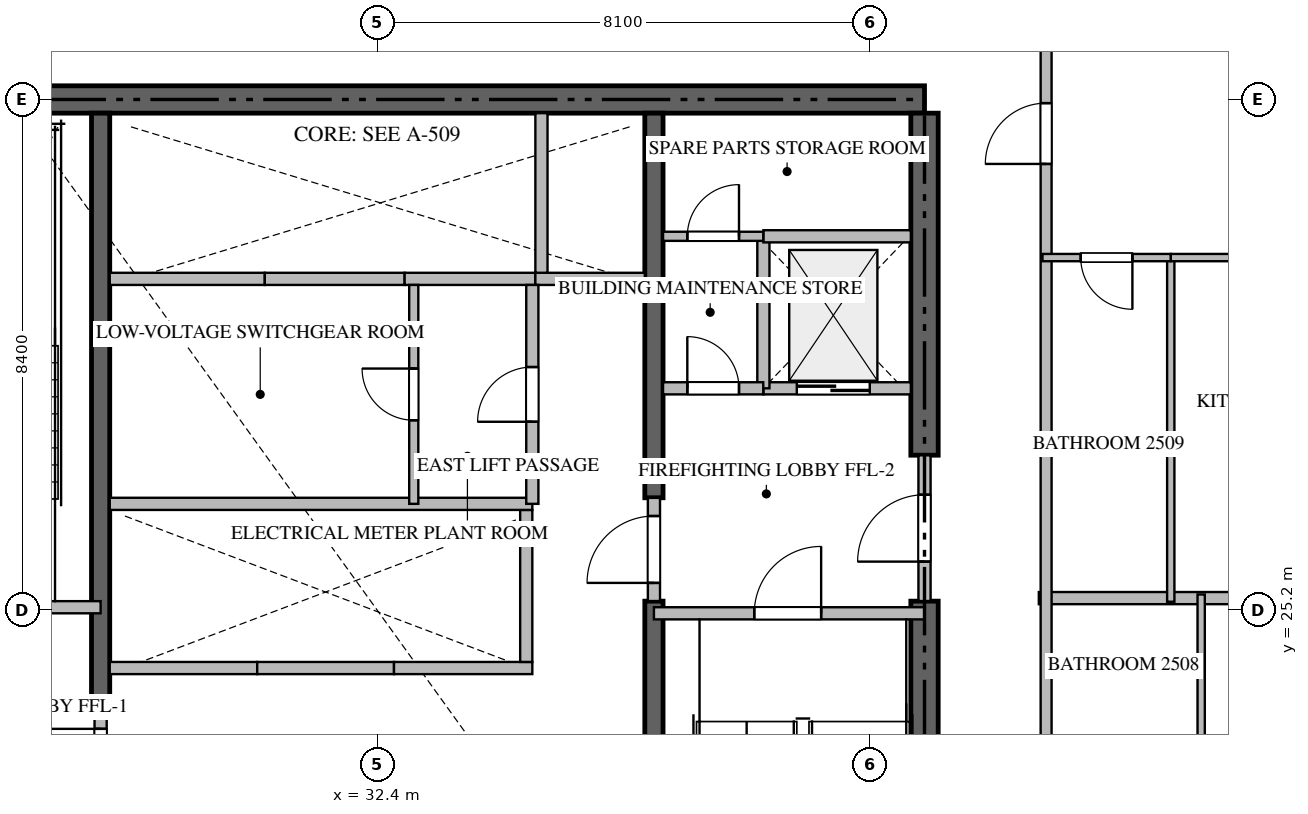
"""IFC4 building model, lengths in metres.
Left out: names, types, materials, properties, quantities, classifications, styles, units other than length and angle.
Written with IfcOpenShell. Run it as: python <this file> out.ifc"""

import sys

from ifc_helpers import new_model, si_unit, direction, frame, frame_2d, origin, place, context, subcontext, project, spatial, rectangle, extrude, source, transform, mapped, element, fill, save


model = new_model("IFC4")
c1 = context("Model", 3, precision=1e-05, world=origin(), true_north=direction((0.0, 1.0)))
c2 = subcontext(c1, "Body", "Model", "MODEL_VIEW")
j1 = project(units=[si_unit("LENGTHUNIT", "METRE"), si_unit("PLANEANGLEUNIT", "RADIAN")], contexts=[c1])
p1 = place(None, origin())
s1 = spatial("IfcSite", under=j1, at=p1, CompositionType="ELEMENT")
p2 = place(p1, origin())
s2 = spatial("IfcBuilding", under=s1, at=p2, CompositionType="ELEMENT")
p3 = place(p2, frame((0.0, 0.0, 101.7)))
s3 = spatial("IfcBuildingStorey", under=s2, at=p3, CompositionType="ELEMENT", Elevation=101.7)
p4 = place(p3, frame((41.4, 33.6, -0.26), z_axis=(0.0, 0.0, 1.0), x_axis=(-1.0, 0.0, 0.0)))
e1 = element("IfcWall", 1, at=p4, inside=s3, PredefinedType="SHEAR", context=c2, shape_type="SweptSolid", body=[
    extrude(rectangle(XDim=18.0, YDim=0.45, at=frame_2d((9.0, 0.0))), origin(), (0.0, 0.0, 1.0), 3.748),
])
p5 = place(p3, frame((41.4, 17.025, -0.26), z_axis=(0.0, 0.0, 1.0), x_axis=(0.0, 1.0, 0.0)))
e2 = element("IfcWall", 2, at=p5, inside=s3, PredefinedType="SHEAR", context=c2, shape_type="SweptSolid", body=[
    extrude(rectangle(XDim=8.325, YDim=0.45, at=frame_2d((4.163, 0.0))), origin(), (0.0, 0.0, 1.0), 3.748),
])
p6 = place(p3, frame((41.4, 27.75, -0.26), z_axis=(0.0, 0.0, 1.0), x_axis=(0.0, 1.0, 0.0)))
e3 = element("IfcWall", 3, at=p6, inside=s3, PredefinedType="SHEAR", context=c2, shape_type="SweptSolid", body=[
    extrude(rectangle(XDim=5.625, YDim=0.45, at=frame_2d((2.812, 0.0))), origin(), (0.0, 0.0, 1.0), 3.748),
])
p7 = place(p3, frame((27.85, 23.55, -0.26), z_axis=(0.0, 0.0, 1.0), x_axis=(0.0, 1.0, 0.0)))
e4 = element("IfcWall", 4, at=p7, inside=s3, PredefinedType="SHEAR", context=c2, shape_type="SweptSolid", body=[
    extrude(rectangle(XDim=9.825, YDim=0.3, at=frame_2d((4.913, 0.0))), origin(), (0.0, 0.0, 1.0), 3.748),
])
p8 = place(p3, frame((36.95, 17.025, -0.26), z_axis=(0.0, 0.0, 1.0), x_axis=(0.0, 1.0, 0.0)))
e5 = element("IfcWall", 5, at=p8, inside=s3, PredefinedType="SHEAR", context=c2, shape_type="SweptSolid", body=[
    extrude(rectangle(XDim=8.325, YDim=0.3, at=frame_2d((4.163, 0.0))), origin(), (0.0, 0.0, 1.0), 3.748),
])
p9 = place(p3, frame((36.95, 27.05, -0.26), z_axis=(0.0, 0.0, 1.0), x_axis=(0.0, 1.0, 0.0)))
e6 = element("IfcWall", 6, at=p9, inside=s3, PredefinedType="SHEAR", context=c2, shape_type="SweptSolid", body=[
    extrude(rectangle(XDim=6.325, YDim=0.3, at=frame_2d((3.163, 0.0))), origin(), (0.0, 0.0, 1.0), 3.748),
])
p10 = place(p3, frame((23.4, 25.25, 0.0), z_axis=(0.0, 0.0, 1.0), x_axis=(1.0, 0.0, 0.0)))
e7 = element("IfcWall", 7, at=p10, inside=s3, PredefinedType="STANDARD", context=c2, shape_type="SweptSolid", body=[
    extrude(rectangle(XDim=4.45, YDim=0.2, at=frame_2d((2.225, 0.0))), origin(), (0.0, 0.0, 1.0), 3.49),
])
p11 = place(p10, frame((1.65, 0.0, 0.0)))
e8 = element("IfcOpeningElement", 8, at=p11, cuts=e7, PredefinedType="OPENING", context=c2, shape_type="SweptSolid", body=[
    extrude(rectangle(XDim=1.1, YDim=2.15, at=frame_2d((0.55, 1.075))), frame((0.0, 0.11, 0.0), z_axis=(0.0, -1.0, 0.0), x_axis=(1.0, 0.0, 0.0)), (0.0, 0.0, 1.0), 0.22),
])
p12 = place(p3, frame((36.95, 25.15, 0.0), z_axis=(0.0, 0.0, 1.0), x_axis=(1.0, 0.0, 0.0)))
e9 = element("IfcWall", 9, at=p12, inside=s3, PredefinedType="STANDARD", context=c2, shape_type="SweptSolid", body=[
    extrude(rectangle(XDim=4.45, YDim=0.2, at=frame_2d((2.225, 0.0))), origin(), (0.0, 0.0, 1.0), 3.49),
])
p13 = place(p12, frame((1.65, 0.0, 0.0)))
e10 = element("IfcOpeningElement", 10, at=p13, cuts=e9, PredefinedType="OPENING", context=c2, shape_type="SweptSolid", body=[
    extrude(rectangle(XDim=1.1, YDim=2.15, at=frame_2d((0.55, 1.075))), frame((0.0, 0.11, 0.0), z_axis=(0.0, -1.0, 0.0), x_axis=(1.0, 0.0, 0.0)), (0.0, 0.0, 1.0), 0.22),
])
p14 = place(p3, frame((38.75, 28.85, 0.0), z_axis=(0.0, 0.0, 1.0), x_axis=(1.0, 0.0, 0.0)))
e11 = element("IfcWall", 11, at=p14, inside=s3, PredefinedType="STANDARD", context=c2, shape_type="SweptSolid", body=[
    extrude(rectangle(XDim=2.425, YDim=0.2, at=frame_2d((1.212, 0.0))), origin(), (0.0, 0.0, 1.0), 3.49),
])
p15 = place(p14, frame((0.55, 0.0, 0.0)))
e12 = element("IfcOpeningElement", 12, at=p15, cuts=e11, PredefinedType="OPENING", context=c2, shape_type="SweptSolid", body=[
    extrude(rectangle(XDim=1.2, YDim=2.2, at=frame_2d((0.6, 1.1))), frame((0.0, 0.11, 0.0), z_axis=(0.0, -1.0, 0.0), x_axis=(1.0, 0.0, 0.0)), (0.0, 0.0, 1.0), 0.22),
])
p16 = place(p3, frame((28.0, 24.25, 0.0), z_axis=(0.0, 0.0, 1.0), x_axis=(1.0, 0.0, 0.0)))
e13 = element("IfcWall", 13, at=p16, inside=s3, PredefinedType="STANDARD", context=c2, shape_type="SweptSolid", body=[
    extrude(rectangle(XDim=2.425, YDim=0.2, at=frame_2d((1.212, 0.0))), origin(), (0.0, 0.0, 1.0), 3.49),
])
p17 = place(p3, frame((30.425, 24.25, 0.0), z_axis=(0.0, 0.0, 1.0), x_axis=(1.0, 0.0, 0.0)))
e14 = element("IfcWall", 14, at=p17, inside=s3, PredefinedType="STANDARD", context=c2, shape_type="SweptSolid", body=[
    extrude(rectangle(XDim=2.25, YDim=0.2, at=frame_2d((1.125, 0.0))), origin(), (0.0, 0.0, 1.0), 3.49),
])
p18 = place(p3, frame((32.675, 24.25, 0.0), z_axis=(0.0, 0.0, 1.0), x_axis=(1.0, 0.0, 0.0)))
e15 = element("IfcWall", 15, at=p18, inside=s3, PredefinedType="STANDARD", context=c2, shape_type="SweptSolid", body=[
    extrude(rectangle(XDim=2.275, YDim=0.2, at=frame_2d((1.137, 0.0))), origin(), (0.0, 0.0, 1.0), 3.49),
])
p19 = place(p3, frame((34.85, 24.35, 0.0), z_axis=(0.0, 0.0, 1.0), x_axis=(0.0, 1.0, 0.0)))
e16 = element("IfcWall", 16, at=p19, inside=s3, PredefinedType="STANDARD", context=c2, shape_type="SweptSolid", body=[
    extrude(rectangle(XDim=2.5, YDim=0.2, at=frame_2d((1.25, 0.0))), origin(), (0.0, 0.0, 1.0), 3.49),
])
p20 = place(p3, frame((28.0, 30.65, 0.0), z_axis=(0.0, 0.0, 1.0), x_axis=(1.0, 0.0, 0.0)))
e17 = element("IfcWall", 17, at=p20, inside=s3, PredefinedType="STANDARD", context=c2, shape_type="SweptSolid", body=[
    extrude(rectangle(XDim=2.55, YDim=0.2, at=frame_2d((1.275, 0.0))), origin(), (0.0, 0.0, 1.0), 3.49),
])
p21 = place(p3, frame((30.55, 30.65, 0.0), z_axis=(0.0, 0.0, 1.0), x_axis=(1.0, 0.0, 0.0)))
e18 = element("IfcWall", 18, at=p21, inside=s3, PredefinedType="STANDARD", context=c2, shape_type="SweptSolid", body=[
    extrude(rectangle(XDim=2.3, YDim=0.2, at=frame_2d((1.15, 0.0))), origin(), (0.0, 0.0, 1.0), 3.49),
])
p22 = place(p3, frame((32.85, 30.65, 0.0), z_axis=(0.0, 0.0, 1.0), x_axis=(1.0, 0.0, 0.0)))
e19 = element("IfcWall", 19, at=p22, inside=s3, PredefinedType="STANDARD", context=c2, shape_type="SweptSolid", body=[
    extrude(rectangle(XDim=2.15, YDim=0.2, at=frame_2d((1.075, 0.0))), origin(), (0.0, 0.0, 1.0), 3.49),
])
p23 = place(p3, frame((35.0, 30.65, 0.0), z_axis=(0.0, 0.0, 1.0), x_axis=(1.0, 0.0, 0.0)))
e20 = element("IfcWall", 20, at=p23, inside=s3, PredefinedType="STANDARD", context=c2, shape_type="SweptSolid", body=[
    extrude(rectangle(XDim=1.8, YDim=0.2, at=frame_2d((0.9, 0.0))), origin(), (0.0, 0.0, 1.0), 3.49),
])
p24 = place(p3, frame((35.1, 30.75, 0.0), z_axis=(0.0, 0.0, 1.0), x_axis=(0.0, 1.0, 0.0)))
e21 = element("IfcWall", 21, at=p24, inside=s3, PredefinedType="STANDARD", context=c2, shape_type="SweptSolid", body=[
    extrude(rectangle(XDim=2.625, YDim=0.2, at=frame_2d((1.312, 0.0))), origin(), (0.0, 0.0, 1.0), 3.49),
])
p25 = place(p3, frame((38.75, 28.85, 0.0), z_axis=(0.0, 0.0, 1.0), x_axis=(0.0, 1.0, 0.0)))
e22 = element("IfcWall", 22, at=p25, inside=s3, PredefinedType="STANDARD", context=c2, shape_type="SweptSolid", body=[
    extrude(rectangle(XDim=2.5, YDim=0.2, at=frame_2d((1.25, 0.0))), origin(), (0.0, 0.0, 1.0), 3.49),
])
p26 = place(p3, frame((38.75, 31.35, 0.0), z_axis=(0.0, 0.0, 1.0), x_axis=(1.0, 0.0, 0.0)))
e23 = element("IfcWall", 23, at=p26, inside=s3, PredefinedType="STANDARD", context=c2, shape_type="SweptSolid", body=[
    extrude(rectangle(XDim=2.425, YDim=0.2, at=frame_2d((1.212, 0.0))), origin(), (0.0, 0.0, 1.0), 3.49),
])
p27 = place(p3, frame((37.1, 28.85, 0.0), z_axis=(0.0, 0.0, 1.0), x_axis=(1.0, 0.0, 0.0)))
e24 = element("IfcWall", 24, at=p27, inside=s3, PredefinedType="STANDARD", context=c2, shape_type="SweptSolid", body=[
    extrude(rectangle(XDim=1.648, YDim=0.2, at=frame_2d((0.824, 0.0))), origin(), (0.0, 0.0, 1.0), 3.49),
])
p28 = place(p27, frame((0.399, 0.0, 0.0)))
e25 = element("IfcOpeningElement", 25, at=p28, cuts=e24, PredefinedType="OPENING", context=c2, shape_type="SweptSolid", body=[
    extrude(rectangle(XDim=0.85, YDim=2.1, at=frame_2d((0.425, 1.05))), frame((0.0, 0.11, 0.0), z_axis=(0.0, -1.0, 0.0), x_axis=(1.0, 0.0, 0.0)), (0.0, 0.0, 1.0), 0.22),
])
p29 = place(p3, frame((41.4, 25.352, 0.0), z_axis=(0.0, 0.0, 1.0), x_axis=(0.0, 1.0, 0.0)))
e26 = element("IfcWall", 26, at=p29, inside=s3, PredefinedType="STANDARD", context=c2, shape_type="SweptSolid", body=[
    extrude(rectangle(XDim=2.396, YDim=0.2, at=frame_2d((1.198, 0.0))), origin(), (0.0, 0.0, 1.0), 3.49),
])
p30 = place(p29, frame((0.648, 0.0, 0.0)))
e27 = element("IfcOpeningElement", 27, at=p30, cuts=e26, PredefinedType="OPENING", context=c2, shape_type="SweptSolid", body=[
    extrude(rectangle(XDim=1.1, YDim=2.15, at=frame_2d((0.55, 1.075))), frame((0.0, 0.11, 0.0), z_axis=(0.0, -1.0, 0.0), x_axis=(1.0, 0.0, 0.0)), (0.0, 0.0, 1.0), 0.22),
])
p31 = place(p3, frame((27.85, 21.852, 0.0), z_axis=(0.0, 0.0, 1.0), x_axis=(0.0, 1.0, 0.0)))
e28 = element("IfcWall", 28, at=p31, inside=s3, PredefinedType="STANDARD", context=c2, shape_type="SweptSolid", body=[
    extrude(rectangle(XDim=1.696, YDim=0.2, at=frame_2d((0.848, 0.0))), origin(), (0.0, 0.0, 1.0), 3.49),
])
p32 = place(p31, frame((0.298, 0.0, 0.0)))
e29 = element("IfcOpeningElement", 29, at=p32, cuts=e28, PredefinedType="OPENING", context=c2, shape_type="SweptSolid", body=[
    extrude(rectangle(XDim=1.1, YDim=2.15, at=frame_2d((0.55, 1.075))), frame((0.0, 0.11, 0.0), z_axis=(0.0, -1.0, 0.0), x_axis=(1.0, 0.0, 0.0)), (0.0, 0.0, 1.0), 0.22),
])
p33 = place(p3, frame((36.95, 25.352, 0.0), z_axis=(0.0, 0.0, 1.0), x_axis=(0.0, 1.0, 0.0)))
e30 = element("IfcWall", 30, at=p33, inside=s3, PredefinedType="STANDARD", context=c2, shape_type="SweptSolid", body=[
    extrude(rectangle(XDim=1.696, YDim=0.2, at=frame_2d((0.848, 0.0))), origin(), (0.0, 0.0, 1.0), 3.49),
])
p34 = place(p33, frame((0.298, 0.0, 0.0)))
e31 = element("IfcOpeningElement", 31, at=p34, cuts=e30, PredefinedType="OPENING", context=c2, shape_type="SweptSolid", body=[
    extrude(rectangle(XDim=1.1, YDim=2.15, at=frame_2d((0.55, 1.075))), frame((0.0, 0.11, 0.0), z_axis=(0.0, -1.0, 0.0), x_axis=(1.0, 0.0, 0.0)), (0.0, 0.0, 1.0), 0.22),
])
p35 = place(p3, frame((28.0, 26.95, 0.0), z_axis=(0.0, 0.0, 1.0), x_axis=(1.0, 0.0, 0.0)))
e32 = element("IfcWall", 32, at=p35, inside=s3, PredefinedType="STANDARD", context=c2, shape_type="SweptSolid", body=[
    extrude(rectangle(XDim=6.95, YDim=0.2, at=frame_2d((3.475, 0.0))), origin(), (0.0, 0.0, 1.0), 3.49),
])
p36 = place(p3, frame((37.1, 31.35, 0.0), z_axis=(0.0, 0.0, 1.0), x_axis=(1.0, 0.0, 0.0)))
e33 = element("IfcWall", 33, at=p36, inside=s3, PredefinedType="PARTITIONING", context=c2, shape_type="SweptSolid", body=[
    extrude(rectangle(XDim=1.648, YDim=0.15, at=frame_2d((0.824, 0.0))), origin(), (0.0, 0.0, 1.0), 3.49),
])
p37 = place(p36, frame((0.399, 0.0, 0.0)))
e34 = element("IfcOpeningElement", 34, at=p37, cuts=e33, PredefinedType="OPENING", context=c2, shape_type="SweptSolid", body=[
    extrude(rectangle(XDim=0.85, YDim=2.1, at=frame_2d((0.425, 1.05))), frame((0.0, 0.085, 0.0), z_axis=(0.0, -1.0, 0.0), x_axis=(1.0, 0.0, 0.0)), (0.0, 0.0, 1.0), 0.17),
])
p38 = place(p3, frame((34.95, 26.95, 0.0), z_axis=(0.0, 0.0, 1.0), x_axis=(0.0, 1.0, 0.0)))
e35 = element("IfcWall", 35, at=p38, inside=s3, PredefinedType="STANDARD", context=c2, shape_type="SweptSolid", body=[
    extrude(rectangle(XDim=3.6, YDim=0.2, at=frame_2d((1.8, 0.0))), origin(), (0.0, 0.0, 1.0), 3.49),
])
p39 = place(p38, frame((1.35, 0.0, 0.0)))
e36 = element("IfcOpeningElement", 36, at=p39, cuts=e35, PredefinedType="OPENING", context=c2, shape_type="SweptSolid", body=[
    extrude(rectangle(XDim=0.9, YDim=2.1, at=frame_2d((0.45, 1.05))), frame((0.0, 0.11, 0.0), z_axis=(0.0, -1.0, 0.0), x_axis=(1.0, 0.0, 0.0)), (0.0, 0.0, 1.0), 0.22),
])
p40 = place(p3, frame((33.0, 26.95, 0.0), z_axis=(0.0, 0.0, 1.0), x_axis=(0.0, 1.0, 0.0)))
e37 = element("IfcWall", 37, at=p40, inside=s3, PredefinedType="PARTITIONING", context=c2, shape_type="SweptSolid", body=[
    extrude(rectangle(XDim=3.6, YDim=0.15, at=frame_2d((1.8, 0.0))), origin(), (0.0, 0.0, 1.0), 3.49),
])
p41 = place(p40, frame((1.375, 0.0, 0.0)))
e38 = element("IfcOpeningElement", 38, at=p41, cuts=e37, PredefinedType="OPENING", context=c2, shape_type="SweptSolid", body=[
    extrude(rectangle(XDim=0.85, YDim=2.1, at=frame_2d((0.425, 1.05))), frame((0.0, 0.085, 0.0), z_axis=(0.0, -1.0, 0.0), x_axis=(1.0, 0.0, 0.0)), (0.0, 0.0, 1.0), 0.17),
])
p42 = place(p3, frame((43.28, 25.4, 0.0), z_axis=(0.0, 0.0, 1.0), x_axis=(1.0, 0.0, 0.0)))
e39 = element("IfcWall", 39, at=p42, inside=s3, PredefinedType="PARTITIONING", context=c2, shape_type="SweptSolid", body=[
    extrude(rectangle(XDim=15.438, YDim=0.2, at=frame_2d((7.719, 0.0))), origin(), (0.0, 0.0, 1.0), 3.49),
])
p43 = place(p3, frame((43.4, 14.9, 0.0), z_axis=(0.0, 0.0, 1.0), x_axis=(0.0, 1.0, 0.0)))
e40 = element("IfcWall", 40, at=p43, inside=s3, PredefinedType="PARTITIONING", context=c2, shape_type="SweptSolid", body=[
    extrude(rectangle(XDim=20.6, YDim=0.18, at=frame_2d((10.3, 0.0))), origin(), (0.0, 0.0, 1.0), 3.49),
])
p44 = place(p43, frame((3.43, 0.0, 0.0)))
e41 = element("IfcOpeningElement", 41, at=p44, cuts=e40, PredefinedType="OPENING", context=c2, shape_type="SweptSolid", body=[
    extrude(rectangle(XDim=1.0, YDim=2.15, at=frame_2d((0.5, 1.075))), frame((0.0, 0.1, 0.0), z_axis=(0.0, -1.0, 0.0), x_axis=(1.0, 0.0, 0.0)), (0.0, 0.0, 1.0), 0.2),
])
p45 = place(p43, frame((17.64, 0.0, 0.0)))
e42 = element("IfcOpeningElement", 42, at=p45, cuts=e40, PredefinedType="OPENING", context=c2, shape_type="SweptSolid", body=[
    extrude(rectangle(XDim=1.0, YDim=2.15, at=frame_2d((0.5, 1.075))), frame((0.0, 0.1, 0.0), z_axis=(0.0, -1.0, 0.0), x_axis=(1.0, 0.0, 0.0)), (0.0, 0.0, 1.0), 0.2),
])
p46 = place(p3, frame((45.95, 22.65, 0.0), z_axis=(0.0, 0.0, 1.0), x_axis=(0.0, 1.0, 0.0)))
e43 = element("IfcWall", 43, at=p46, inside=s3, PredefinedType="PARTITIONING", context=c2, shape_type="SweptSolid", body=[
    extrude(rectangle(XDim=2.81, YDim=0.12, at=frame_2d((1.405, 0.0))), origin(), (0.0, 0.0, 1.0), 3.49),
])
p47 = place(p3, frame((45.45, 25.34, 0.0), z_axis=(0.0, 0.0, 1.0), x_axis=(0.0, 1.0, 0.0)))
e44 = element("IfcWall", 44, at=p47, inside=s3, PredefinedType="PARTITIONING", context=c2, shape_type="SweptSolid", body=[
    extrude(rectangle(XDim=5.66, YDim=0.12, at=frame_2d((2.83, 0.0))), origin(), (0.0, 0.0, 1.0), 3.49),
])
p48 = place(p3, frame((48.394, 31.0, 0.0), z_axis=(0.0, 0.0, 1.0), x_axis=(-1.0, 0.0, 0.0)))
e45 = element("IfcWall", 45, at=p48, inside=s3, PredefinedType="PARTITIONING", context=c2, shape_type="SweptSolid", body=[
    extrude(rectangle(XDim=2.944, YDim=0.12, at=frame_2d((1.472, 0.0))), origin(), (0.0, 0.0, 1.0), 3.49),
])
p49 = place(p48, frame((1.047, 0.0, 0.0)))
e46 = element("IfcOpeningElement", 46, at=p49, cuts=e45, PredefinedType="OPENING", context=c2, shape_type="SweptSolid", body=[
    extrude(rectangle(XDim=0.85, YDim=2.1, at=frame_2d((0.425, 1.05))), frame((0.0, 0.07, 0.0), z_axis=(0.0, -1.0, 0.0), x_axis=(1.0, 0.0, 0.0)), (0.0, 0.0, 1.0), 0.14),
])
p50 = place(p3, frame((45.448, 31.0, 0.0), z_axis=(0.0, 0.0, 1.0), x_axis=(-1.0, 0.0, 0.0)))
e47 = element("IfcWall", 47, at=p50, inside=s3, PredefinedType="PARTITIONING", context=c2, shape_type="SweptSolid", body=[
    extrude(rectangle(XDim=2.108, YDim=0.12, at=frame_2d((1.054, 0.0))), origin(), (0.0, 0.0, 1.0), 3.49),
])
p51 = place(p50, frame((0.629, 0.0, 0.0)))
e48 = element("IfcOpeningElement", 48, at=p51, cuts=e47, PredefinedType="OPENING", context=c2, shape_type="SweptSolid", body=[
    extrude(rectangle(XDim=0.85, YDim=2.1, at=frame_2d((0.425, 1.05))), frame((0.0, 0.07, 0.0), z_axis=(0.0, -1.0, 0.0), x_axis=(1.0, 0.0, 0.0)), (0.0, 0.0, 1.0), 0.14),
])
m1 = source(origin(), c2, "Body", "SweptSolid", [
    extrude(rectangle(XDim=1.1, YDim=2.15, at=frame_2d((0.55, 1.075))), frame((0.0, 0.025, 0.0), z_axis=(0.0, -1.0, 0.0), x_axis=(1.0, 0.0, 0.0)), (0.0, 0.0, 1.0), 0.05),
])
p52 = place(p13, origin())
e49 = element("IfcDoor", 49, at=p52, inside=s3, OperationType="SINGLE_SWING_RIGHT", PredefinedType="DOOR", context=c2, shape_type="MappedRepresentation", body=[
    mapped(m1, transform((0.0, 0.0, 0.0), scale=1.0)),
])
fill(e10, e49)
m2 = source(origin(), c2, "Body", "SweptSolid", [
    extrude(rectangle(XDim=1.2, YDim=2.2, at=frame_2d((0.6, 1.1))), frame((0.0, 0.025, 0.0), z_axis=(0.0, -1.0, 0.0), x_axis=(1.0, 0.0, 0.0)), (0.0, 0.0, 1.0), 0.05),
])
p53 = place(p15, origin())
e50 = element("IfcDoor", 50, at=p53, inside=s3, OperationType="DOUBLE_DOOR_SLIDING", PredefinedType="DOOR", context=c2, shape_type="MappedRepresentation", body=[
    mapped(m2, transform((0.0, 0.0, 0.0), scale=1.0)),
])
fill(e12, e50)
m3 = source(origin(), c2, "Body", "SweptSolid", [
    extrude(rectangle(XDim=0.85, YDim=2.1, at=frame_2d((0.425, 1.05))), frame((0.0, 0.025, 0.0), z_axis=(0.0, -1.0, 0.0), x_axis=(1.0, 0.0, 0.0)), (0.0, 0.0, 1.0), 0.05),
])
p54 = place(p28, origin())
e51 = element("IfcDoor", 51, at=p54, inside=s3, OperationType="SINGLE_SWING_LEFT", PredefinedType="DOOR", context=c2, shape_type="MappedRepresentation", body=[
    mapped(m3, transform((0.0, 0.0, 0.0), scale=1.0)),
])
fill(e25, e51)
p55 = place(p30, origin())
e52 = element("IfcDoor", 52, at=p55, inside=s3, OperationType="SINGLE_SWING_LEFT", PredefinedType="DOOR", context=c2, shape_type="MappedRepresentation", body=[
    mapped(m1, transform((0.0, 0.0, 0.0), scale=1.0)),
])
fill(e27, e52)
p56 = place(p32, origin())
e53 = element("IfcDoor", 53, at=p56, inside=s3, OperationType="SINGLE_SWING_RIGHT", PredefinedType="DOOR", context=c2, shape_type="MappedRepresentation", body=[
    mapped(m1, transform((0.0, 0.0, 0.0), scale=1.0)),
])
fill(e29, e53)
p57 = place(p34, origin())
e54 = element("IfcDoor", 54, at=p57, inside=s3, OperationType="SINGLE_SWING_LEFT", PredefinedType="DOOR", context=c2, shape_type="MappedRepresentation", body=[
    mapped(m1, transform((0.0, 0.0, 0.0), scale=1.0)),
])
fill(e31, e54)
p58 = place(p37, origin())
e55 = element("IfcDoor", 55, at=p58, inside=s3, OperationType="SINGLE_SWING_RIGHT", PredefinedType="DOOR", context=c2, shape_type="MappedRepresentation", body=[
    mapped(m3, transform((0.0, 0.0, 0.0), scale=1.0)),
])
fill(e34, e55)
m4 = source(origin(), c2, "Body", "SweptSolid", [
    extrude(rectangle(XDim=0.9, YDim=2.1, at=frame_2d((0.45, 1.05))), frame((0.0, 0.025, 0.0), z_axis=(0.0, -1.0, 0.0), x_axis=(1.0, 0.0, 0.0)), (0.0, 0.0, 1.0), 0.05),
])
p59 = place(p39, origin())
e56 = element("IfcDoor", 56, at=p59, inside=s3, OperationType="SINGLE_SWING_LEFT", PredefinedType="DOOR", context=c2, shape_type="MappedRepresentation", body=[
    mapped(m4, transform((0.0, 0.0, 0.0), scale=1.0)),
])
fill(e36, e56)
p60 = place(p41, origin())
e57 = element("IfcDoor", 57, at=p60, inside=s3, OperationType="SINGLE_SWING_RIGHT", PredefinedType="DOOR", context=c2, shape_type="MappedRepresentation", body=[
    mapped(m3, transform((0.0, 0.0, 0.0), scale=1.0)),
])
fill(e38, e57)
m5 = source(origin(), c2, "Body", "SweptSolid", [
    extrude(rectangle(XDim=1.0, YDim=2.15, at=frame_2d((0.5, 1.075))), frame((0.0, 0.025, 0.0), z_axis=(0.0, -1.0, 0.0), x_axis=(1.0, 0.0, 0.0)), (0.0, 0.0, 1.0), 0.05),
])
p61 = place(p45, origin())
e58 = element("IfcDoor", 58, at=p61, inside=s3, OperationType="SINGLE_SWING_LEFT", PredefinedType="DOOR", context=c2, shape_type="MappedRepresentation", body=[
    mapped(m5, transform((0.0, 0.0, 0.0), scale=1.0)),
])
fill(e42, e58)
p62 = place(p51, origin())
e59 = element("IfcDoor", 59, at=p62, inside=s3, OperationType="SINGLE_SWING_LEFT", PredefinedType="DOOR", context=c2, shape_type="MappedRepresentation", body=[
    mapped(m3, transform((0.0, 0.0, 0.0), scale=1.0)),
])
fill(e48, e59)
save(model, sys.argv[1])
